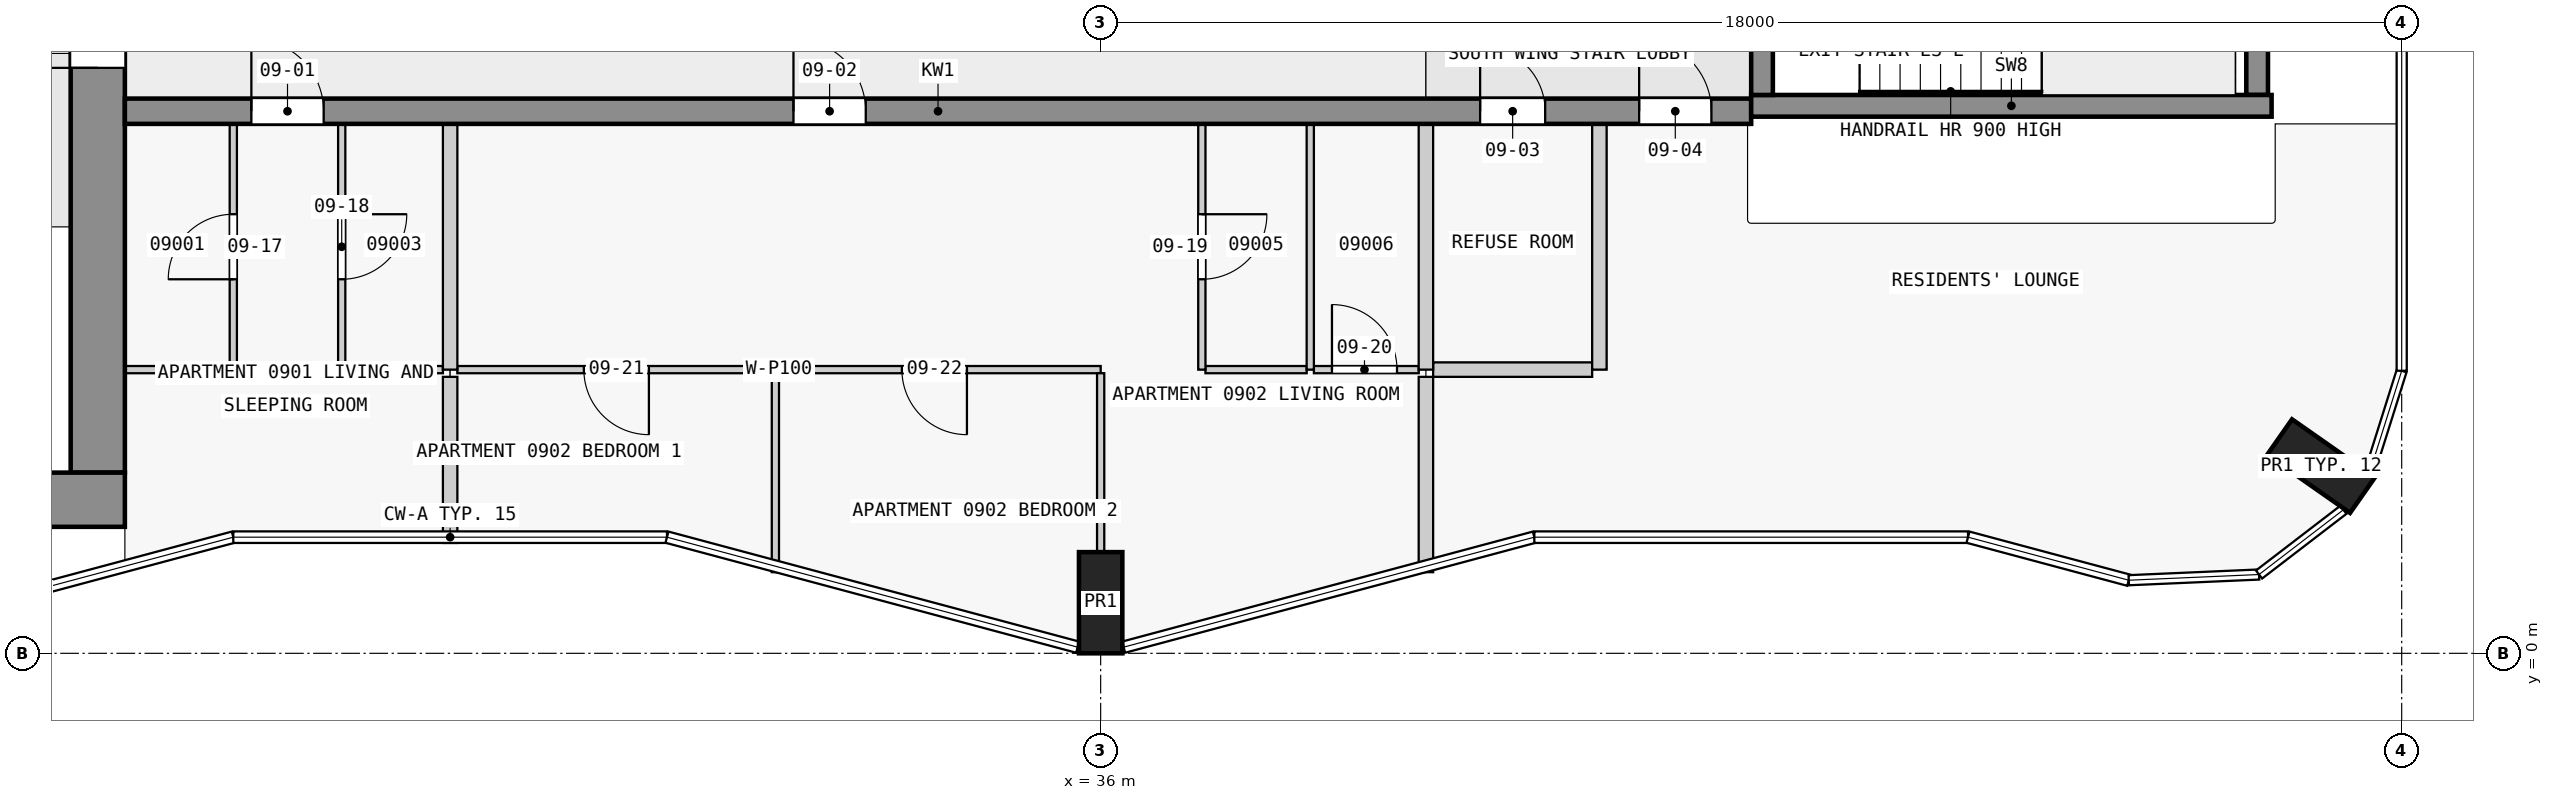
"""IFC4 building model, lengths in metres.
Left out: names, types, materials, properties, quantities, classifications, styles, units other than length and angle.
Written with IfcOpenShell. Run it as: python <this file> out.ifc"""

import sys

from ifc_helpers import new_model, si_unit, direction, frame, frame_2d, origin, origin_2d, place, context, subcontext, project, spatial, rectangle, extrude, element, fill, save


model = new_model("IFC4")
c1 = context("Model", 3, precision=1e-05, world=origin(), true_north=direction((0.0, 1.0)))
c2 = subcontext(c1, "Body", "Model", "MODEL_VIEW")
j1 = project(units=[si_unit("LENGTHUNIT", "METRE"), si_unit("PLANEANGLEUNIT", "RADIAN")], contexts=[c1])
p1 = place(None, origin())
s1 = spatial("IfcSite", under=j1, at=p1, CompositionType="ELEMENT")
p2 = place(p1, origin())
s2 = spatial("IfcBuilding", under=s1, at=p2, CompositionType="ELEMENT")
p3 = place(p2, frame((0.0, 0.0, 40.8)))
s3 = spatial("IfcBuildingStorey", under=s2, at=p3, CompositionType="ELEMENT", Elevation=40.8)
for number, where, z_axis, x_axis in (
    (1, (36.0, 0.7, 0.0), (0.0, 0.0, 1.0), (1.0, 0.0, 0.0)),
    (2, (52.884, 2.59, 0.0), (0.0, 0.0, 1.0), (0.574, 0.819, 0.0)),
):
    element("IfcColumn", number, at=place(p3, frame(where, z_axis=z_axis, x_axis=x_axis)), inside=s3, PredefinedType="COLUMN", context=c2, shape_type="SweptSolid", body=[
        extrude(rectangle(XDim=0.6, YDim=1.4, at=origin_2d()), origin(), (0.0, 0.0, 1.0), 3.5),
    ])
p4 = place(p3, frame((1.55, 2.125, 0.0), z_axis=(0.0, 0.0, 1.0), x_axis=(1.0, 0.0, 0.0)))
e3 = element("IfcWall", 3, at=p4, inside=s3, PredefinedType="SHEAR", context=c2, shape_type="SweptSolid", body=[
    extrude(rectangle(XDim=20.95, YDim=0.75, at=frame_2d((10.475, 0.0))), origin(), (0.0, 0.0, 1.0), 3.25),
])
p5 = place(p3, frame((22.125, 2.5, 0.0), z_axis=(0.0, 0.0, 1.0), x_axis=(0.0, 1.0, 0.0)))
e4 = element("IfcWall", 4, at=p5, inside=s3, PredefinedType="SHEAR", context=c2, shape_type="SweptSolid", body=[
    extrude(rectangle(XDim=14.75, YDim=0.75, at=frame_2d((7.375, 0.0))), origin(), (0.0, 0.0, 1.0), 3.25),
])
p6 = place(p5, frame((5.6, 0.0, 0.0)))
e5 = element("IfcOpeningElement", 5, at=p6, cuts=e4, PredefinedType="OPENING", context=c2, shape_type="SweptSolid", body=[
    extrude(rectangle(XDim=1.8, YDim=2.1, at=frame_2d((0.9, 1.05))), frame((0.0, 0.385, 0.0), z_axis=(0.0, -1.0, 0.0), x_axis=(1.0, 0.0, 0.0)), (0.0, 0.0, 1.0), 0.77),
])
p7 = place(p3, frame((45.15, 7.725, 0.0), z_axis=(0.0, 0.0, 1.0), x_axis=(0.0, 1.0, 0.0)))
e6 = element("IfcWall", 6, at=p7, inside=s3, PredefinedType="SHEAR", context=c2, shape_type="SweptSolid", body=[
    extrude(rectangle(XDim=2.55, YDim=0.3, at=frame_2d((1.275, 0.0))), origin(), (0.0, 0.0, 1.0), 3.5),
])
p8 = place(p7, frame((0.725, 0.0, 0.0)))
e7 = element("IfcOpeningElement", 7, at=p8, cuts=e6, PredefinedType="OPENING", context=c2, shape_type="SweptSolid", body=[
    extrude(rectangle(XDim=1.1, YDim=2.1, at=frame_2d((0.55, 1.05))), frame((0.0, 0.16, 0.0), z_axis=(0.0, -1.0, 0.0), x_axis=(1.0, 0.0, 0.0)), (0.0, 0.0, 1.0), 0.32),
])
p9 = place(p3, frame((52.0, 7.725, 0.0), z_axis=(0.0, 0.0, 1.0), x_axis=(0.0, 1.0, 0.0)))
e8 = element("IfcWall", 8, at=p9, inside=s3, PredefinedType="SHEAR", context=c2, shape_type="SweptSolid", body=[
    extrude(rectangle(XDim=2.55, YDim=0.3, at=frame_2d((1.275, 0.0))), origin(), (0.0, 0.0, 1.0), 3.5),
])
p10 = place(p3, frame((45.0, 7.575, 0.0), z_axis=(0.0, 0.0, 1.0), x_axis=(1.0, 0.0, 0.0)))
e9 = element("IfcWall", 9, at=p10, inside=s3, PredefinedType="SHEAR", context=c2, shape_type="SweptSolid", body=[
    extrude(rectangle(XDim=7.2, YDim=0.3, at=frame_2d((3.6, 0.0))), origin(), (0.0, 0.0, 1.0), 3.5),
])
p11 = place(p3, frame((22.5, 7.5, 0.0), z_axis=(0.0, 0.0, 1.0), x_axis=(1.0, 0.0, 0.0)))
e10 = element("IfcWall", 10, at=p11, inside=s3, PredefinedType="SHEAR", context=c2, shape_type="SweptSolid", body=[
    extrude(rectangle(XDim=22.5, YDim=0.35, at=frame_2d((11.25, 0.0))), origin(), (0.0, 0.0, 1.0), 3.25),
])
p12 = place(p11, frame((1.75, 0.0, 0.0)))
e11 = element("IfcOpeningElement", 11, at=p12, cuts=e10, PredefinedType="OPENING", context=c2, shape_type="SweptSolid", body=[
    extrude(rectangle(XDim=1.0, YDim=2.1, at=frame_2d((0.5, 1.05))), frame((0.0, 0.185, 0.0), z_axis=(0.0, -1.0, 0.0), x_axis=(1.0, 0.0, 0.0)), (0.0, 0.0, 1.0), 0.37),
])
p13 = place(p11, frame((9.25, 0.0, 0.0)))
e12 = element("IfcOpeningElement", 12, at=p13, cuts=e10, PredefinedType="OPENING", context=c2, shape_type="SweptSolid", body=[
    extrude(rectangle(XDim=1.0, YDim=2.1, at=frame_2d((0.5, 1.05))), frame((0.0, 0.185, 0.0), z_axis=(0.0, -1.0, 0.0), x_axis=(1.0, 0.0, 0.0)), (0.0, 0.0, 1.0), 0.37),
])
p14 = place(p11, frame((18.75, 0.0, 0.0)))
e13 = element("IfcOpeningElement", 13, at=p14, cuts=e10, PredefinedType="OPENING", context=c2, shape_type="SweptSolid", body=[
    extrude(rectangle(XDim=0.9, YDim=2.1, at=frame_2d((0.45, 1.05))), frame((0.0, 0.185, 0.0), z_axis=(0.0, -1.0, 0.0), x_axis=(1.0, 0.0, 0.0)), (0.0, 0.0, 1.0), 0.37),
])
p15 = place(p11, frame((20.95, 0.0, 0.0)))
e14 = element("IfcOpeningElement", 14, at=p15, cuts=e10, PredefinedType="OPENING", context=c2, shape_type="SweptSolid", body=[
    extrude(rectangle(XDim=1.0, YDim=2.1, at=frame_2d((0.5, 1.05))), frame((0.0, 0.185, 0.0), z_axis=(0.0, -1.0, 0.0), x_axis=(1.0, 0.0, 0.0)), (0.0, 0.0, 1.0), 0.37),
])
p16 = place(p3, frame((36.0, 3.925, 0.0), z_axis=(0.0, 0.0, 1.0), x_axis=(-1.0, 0.0, 0.0)))
e15 = element("IfcWall", 15, at=p16, inside=s3, PredefinedType="PARTITIONING", context=c2, shape_type="SweptSolid", body=[
    extrude(rectangle(XDim=8.9, YDim=0.1, at=frame_2d((4.45, 0.0))), origin(), (0.0, 0.0, 1.0), 3.25),
])
p17 = place(p16, frame((6.25, 0.0, 0.0)))
e16 = element("IfcOpeningElement", 16, at=p17, cuts=e15, PredefinedType="OPENING", context=c2, shape_type="SweptSolid", body=[
    extrude(rectangle(XDim=0.9, YDim=2.1, at=frame_2d((0.45, 1.05))), frame((0.0, 0.06, 0.0), z_axis=(0.0, -1.0, 0.0), x_axis=(1.0, 0.0, 0.0)), (0.0, 0.0, 1.0), 0.12),
])
p18 = place(p16, frame((1.85, 0.0, 0.0)))
e17 = element("IfcOpeningElement", 17, at=p18, cuts=e15, PredefinedType="OPENING", context=c2, shape_type="SweptSolid", body=[
    extrude(rectangle(XDim=0.9, YDim=2.1, at=frame_2d((0.45, 1.05))), frame((0.0, 0.06, 0.0), z_axis=(0.0, -1.0, 0.0), x_axis=(1.0, 0.0, 0.0)), (0.0, 0.0, 1.0), 0.12),
])
p19 = place(p3, frame((22.5, 3.925, 0.0), z_axis=(0.0, 0.0, 1.0), x_axis=(1.0, 0.0, 0.0)))
e18 = element("IfcWall", 18, at=p19, inside=s3, PredefinedType="PARTITIONING", context=c2, shape_type="SweptSolid", body=[
    extrude(rectangle(XDim=1.45, YDim=0.1, at=frame_2d((0.725, 0.0))), origin(), (0.0, 0.0, 1.0), 3.25),
])
p20 = place(p3, frame((25.55, 3.925, 0.0), z_axis=(0.0, 0.0, 1.0), x_axis=(1.0, 0.0, 0.0)))
e19 = element("IfcWall", 19, at=p20, inside=s3, PredefinedType="PARTITIONING", context=c2, shape_type="SweptSolid", body=[
    extrude(rectangle(XDim=1.35, YDim=0.1, at=frame_2d((0.675, 0.0))), origin(), (0.0, 0.0, 1.0), 3.25),
])
p21 = place(p3, frame((37.45, 3.925, 0.0), z_axis=(0.0, 0.0, 1.0), x_axis=(1.0, 0.0, 0.0)))
e20 = element("IfcWall", 20, at=p21, inside=s3, PredefinedType="PARTITIONING", context=c2, shape_type="SweptSolid", body=[
    extrude(rectangle(XDim=1.4, YDim=0.1, at=frame_2d((0.7, 0.0))), origin(), (0.0, 0.0, 1.0), 3.25),
])
p22 = place(p3, frame((38.95, 3.925, 0.0), z_axis=(0.0, 0.0, 1.0), x_axis=(1.0, 0.0, 0.0)))
e21 = element("IfcWall", 21, at=p22, inside=s3, PredefinedType="PARTITIONING", context=c2, shape_type="SweptSolid", body=[
    extrude(rectangle(XDim=1.45, YDim=0.1, at=frame_2d((0.725, 0.0))), origin(), (0.0, 0.0, 1.0), 3.25),
])
p23 = place(p22, frame((0.25, 0.0, 0.0)))
e22 = element("IfcOpeningElement", 22, at=p23, cuts=e21, PredefinedType="OPENING", context=c2, shape_type="SweptSolid", body=[
    extrude(rectangle(XDim=0.9, YDim=2.1, at=frame_2d((0.45, 1.05))), frame((0.0, 0.06, 0.0), z_axis=(0.0, -1.0, 0.0), x_axis=(1.0, 0.0, 0.0)), (0.0, 0.0, 1.0), 0.12),
])
p24 = place(p3, frame((40.6, 3.925, 0.0), z_axis=(0.0, 0.0, 1.0), x_axis=(1.0, 0.0, 0.0)))
e23 = element("IfcWall", 23, at=p24, inside=s3, PredefinedType="PARTITIONING", context=c2, shape_type="SweptSolid", body=[
    extrude(rectangle(XDim=2.2, YDim=0.2, at=frame_2d((1.1, 0.0))), origin(), (0.0, 0.0, 1.0), 3.25),
])
p25 = place(p3, frame((24.0, 3.925, 0.0), z_axis=(0.0, 0.0, 1.0), x_axis=(0.0, 1.0, 0.0)))
e24 = element("IfcWall", 24, at=p25, inside=s3, PredefinedType="PARTITIONING", context=c2, shape_type="SweptSolid", body=[
    extrude(rectangle(XDim=3.4, YDim=0.1, at=frame_2d((1.7, 0.0))), origin(), (0.0, 0.0, 1.0), 3.25),
])
p26 = place(p25, frame((1.25, 0.0, 0.0)))
e25 = element("IfcOpeningElement", 25, at=p26, cuts=e24, PredefinedType="OPENING", context=c2, shape_type="SweptSolid", body=[
    extrude(rectangle(XDim=0.9, YDim=2.1, at=frame_2d((0.45, 1.05))), frame((0.0, 0.06, 0.0), z_axis=(0.0, -1.0, 0.0), x_axis=(1.0, 0.0, 0.0)), (0.0, 0.0, 1.0), 0.12),
])
p27 = place(p3, frame((25.5, 7.325, 0.0), z_axis=(0.0, 0.0, 1.0), x_axis=(0.0, -1.0, 0.0)))
e26 = element("IfcWall", 26, at=p27, inside=s3, PredefinedType="PARTITIONING", context=c2, shape_type="SweptSolid", body=[
    extrude(rectangle(XDim=3.4, YDim=0.1, at=frame_2d((1.7, 0.0))), origin(), (0.0, 0.0, 1.0), 3.25),
])
p28 = place(p27, frame((1.25, 0.0, 0.0)))
e27 = element("IfcOpeningElement", 27, at=p28, cuts=e26, PredefinedType="OPENING", context=c2, shape_type="SweptSolid", body=[
    extrude(rectangle(XDim=0.9, YDim=2.1, at=frame_2d((0.45, 1.05))), frame((0.0, 0.06, 0.0), z_axis=(0.0, -1.0, 0.0), x_axis=(1.0, 0.0, 0.0)), (0.0, 0.0, 1.0), 0.12),
])
p29 = place(p3, frame((27.0, 3.825, 0.0), z_axis=(0.0, 0.0, 1.0), x_axis=(0.0, -1.0, 0.0)))
e28 = element("IfcWall", 28, at=p29, inside=s3, PredefinedType="PARTITIONING", context=c2, shape_type="SweptSolid", body=[
    extrude(rectangle(XDim=2.298, YDim=0.2, at=frame_2d((1.149, 0.0))), origin(), (0.0, 0.0, 1.0), 3.25),
])
p30 = place(p3, frame((27.0, 3.925, 0.0), z_axis=(0.0, 0.0, 1.0), x_axis=(0.0, 1.0, 0.0)))
e29 = element("IfcWall", 29, at=p30, inside=s3, PredefinedType="PARTITIONING", context=c2, shape_type="SweptSolid", body=[
    extrude(rectangle(XDim=3.4, YDim=0.2, at=frame_2d((1.7, 0.0))), origin(), (0.0, 0.0, 1.0), 3.25),
])
p31 = place(p3, frame((31.5, 1.122, 0.0), z_axis=(0.0, 0.0, 1.0), x_axis=(0.0, 1.0, 0.0)))
e30 = element("IfcWall", 30, at=p31, inside=s3, PredefinedType="PARTITIONING", context=c2, shape_type="SweptSolid", body=[
    extrude(rectangle(XDim=2.753, YDim=0.1, at=frame_2d((1.376, 0.0))), origin(), (0.0, 0.0, 1.0), 3.25),
])
p32 = place(p3, frame((36.0, 1.4, 0.0), z_axis=(0.0, 0.0, 1.0), x_axis=(0.0, 1.0, 0.0)))
e31 = element("IfcWall", 31, at=p32, inside=s3, PredefinedType="PARTITIONING", context=c2, shape_type="SweptSolid", body=[
    extrude(rectangle(XDim=2.475, YDim=0.1, at=frame_2d((1.238, 0.0))), origin(), (0.0, 0.0, 1.0), 3.25),
])
p33 = place(p3, frame((37.4, 7.325, 0.0), z_axis=(0.0, 0.0, 1.0), x_axis=(0.0, -1.0, 0.0)))
e32 = element("IfcWall", 32, at=p33, inside=s3, PredefinedType="PARTITIONING", context=c2, shape_type="SweptSolid", body=[
    extrude(rectangle(XDim=3.4, YDim=0.1, at=frame_2d((1.7, 0.0))), origin(), (0.0, 0.0, 1.0), 3.25),
])
p34 = place(p33, frame((1.25, 0.0, 0.0)))
e33 = element("IfcOpeningElement", 33, at=p34, cuts=e32, PredefinedType="OPENING", context=c2, shape_type="SweptSolid", body=[
    extrude(rectangle(XDim=0.9, YDim=2.1, at=frame_2d((0.45, 1.05))), frame((0.0, 0.06, 0.0), z_axis=(0.0, -1.0, 0.0), x_axis=(1.0, 0.0, 0.0)), (0.0, 0.0, 1.0), 0.12),
])
p35 = place(p3, frame((38.9, 3.925, 0.0), z_axis=(0.0, 0.0, 1.0), x_axis=(0.0, 1.0, 0.0)))
e34 = element("IfcWall", 34, at=p35, inside=s3, PredefinedType="PARTITIONING", context=c2, shape_type="SweptSolid", body=[
    extrude(rectangle(XDim=3.4, YDim=0.1, at=frame_2d((1.7, 0.0))), origin(), (0.0, 0.0, 1.0), 3.25),
])
p36 = place(p3, frame((40.5, 3.825, 0.0), z_axis=(0.0, 0.0, 1.0), x_axis=(0.0, -1.0, 0.0)))
e35 = element("IfcWall", 35, at=p36, inside=s3, PredefinedType="PARTITIONING", context=c2, shape_type="SweptSolid", body=[
    extrude(rectangle(XDim=2.703, YDim=0.2, at=frame_2d((1.351, 0.0))), origin(), (0.0, 0.0, 1.0), 3.25),
])
for number, where, z_axis, x_axis in (
    (36, (40.5, 3.925, 0.0), (0.0, 0.0, 1.0), (0.0, 1.0, 0.0)),
    (37, (42.9, 3.925, 0.0), (0.0, 0.0, 1.0), (0.0, 1.0, 0.0)),
):
    element("IfcWall", number, at=place(p3, frame(where, z_axis=z_axis, x_axis=x_axis)), inside=s3, PredefinedType="PARTITIONING", context=c2, shape_type="SweptSolid", body=[
        extrude(rectangle(XDim=3.4, YDim=0.2, at=frame_2d((1.7, 0.0))), origin(), (0.0, 0.0, 1.0), 3.25),
    ])
p37 = place(p6, origin())
e38 = element("IfcDoor", 38, at=p37, inside=s3, OperationType="DOUBLE_DOOR_SINGLE_SWING", PredefinedType="DOOR", context=c2, shape_type="SweptSolid", body=[
    extrude(rectangle(XDim=1.8, YDim=2.1, at=frame_2d((0.9, 1.05))), frame((0.0, 0.025, 0.0), z_axis=(0.0, -1.0, 0.0), x_axis=(1.0, 0.0, 0.0)), (0.0, 0.0, 1.0), 0.05),
])
fill(e5, e38)
p38 = place(p12, origin())
e39 = element("IfcDoor", 39, at=p38, inside=s3, OperationType="SINGLE_SWING_LEFT", PredefinedType="DOOR", context=c2, shape_type="SweptSolid", body=[
    extrude(rectangle(XDim=1.0, YDim=2.1, at=frame_2d((0.5, 1.05))), frame((0.0, 0.025, 0.0), z_axis=(0.0, -1.0, 0.0), x_axis=(1.0, 0.0, 0.0)), (0.0, 0.0, 1.0), 0.05),
])
fill(e11, e39)
p39 = place(p13, origin())
e40 = element("IfcDoor", 40, at=p39, inside=s3, OperationType="SINGLE_SWING_LEFT", PredefinedType="DOOR", context=c2, shape_type="SweptSolid", body=[
    extrude(rectangle(XDim=1.0, YDim=2.1, at=frame_2d((0.5, 1.05))), frame((0.0, 0.025, 0.0), z_axis=(0.0, -1.0, 0.0), x_axis=(1.0, 0.0, 0.0)), (0.0, 0.0, 1.0), 0.05),
])
fill(e12, e40)
p40 = place(p14, origin())
e41 = element("IfcDoor", 41, at=p40, inside=s3, OperationType="SINGLE_SWING_RIGHT", PredefinedType="DOOR", context=c2, shape_type="SweptSolid", body=[
    extrude(rectangle(XDim=0.9, YDim=2.1, at=frame_2d((0.45, 1.05))), frame((0.0, 0.025, 0.0), z_axis=(0.0, -1.0, 0.0), x_axis=(1.0, 0.0, 0.0)), (0.0, 0.0, 1.0), 0.05),
])
fill(e13, e41)
p41 = place(p15, origin())
e42 = element("IfcDoor", 42, at=p41, inside=s3, OperationType="SINGLE_SWING_RIGHT", PredefinedType="DOOR", context=c2, shape_type="SweptSolid", body=[
    extrude(rectangle(XDim=1.0, YDim=2.1, at=frame_2d((0.5, 1.05))), frame((0.0, 0.025, 0.0), z_axis=(0.0, -1.0, 0.0), x_axis=(1.0, 0.0, 0.0)), (0.0, 0.0, 1.0), 0.05),
])
fill(e14, e42)
p42 = place(p26, origin())
e43 = element("IfcDoor", 43, at=p42, inside=s3, OperationType="SINGLE_SWING_LEFT", PredefinedType="DOOR", context=c2, shape_type="SweptSolid", body=[
    extrude(rectangle(XDim=0.9, YDim=2.1, at=frame_2d((0.45, 1.05))), frame((0.0, 0.025, 0.0), z_axis=(0.0, -1.0, 0.0), x_axis=(1.0, 0.0, 0.0)), (0.0, 0.0, 1.0), 0.05),
])
fill(e25, e43)
p43 = place(p28, origin())
e44 = element("IfcDoor", 44, at=p43, inside=s3, OperationType="SINGLE_SWING_LEFT", PredefinedType="DOOR", context=c2, shape_type="SweptSolid", body=[
    extrude(rectangle(XDim=0.9, YDim=2.1, at=frame_2d((0.45, 1.05))), frame((0.0, 0.025, 0.0), z_axis=(0.0, -1.0, 0.0), x_axis=(1.0, 0.0, 0.0)), (0.0, 0.0, 1.0), 0.05),
])
fill(e27, e44)
p44 = place(p34, origin())
e45 = element("IfcDoor", 45, at=p44, inside=s3, OperationType="SINGLE_SWING_LEFT", PredefinedType="DOOR", context=c2, shape_type="SweptSolid", body=[
    extrude(rectangle(XDim=0.9, YDim=2.1, at=frame_2d((0.45, 1.05))), frame((0.0, 0.025, 0.0), z_axis=(0.0, -1.0, 0.0), x_axis=(1.0, 0.0, 0.0)), (0.0, 0.0, 1.0), 0.05),
])
fill(e33, e45)
p45 = place(p23, origin())
e46 = element("IfcDoor", 46, at=p45, inside=s3, OperationType="SINGLE_SWING_LEFT", PredefinedType="DOOR", context=c2, shape_type="SweptSolid", body=[
    extrude(rectangle(XDim=0.9, YDim=2.1, at=frame_2d((0.45, 1.05))), frame((0.0, 0.025, 0.0), z_axis=(0.0, -1.0, 0.0), x_axis=(1.0, 0.0, 0.0)), (0.0, 0.0, 1.0), 0.05),
])
fill(e22, e46)
p46 = place(p17, origin())
e47 = element("IfcDoor", 47, at=p46, inside=s3, OperationType="SINGLE_SWING_RIGHT", PredefinedType="DOOR", context=c2, shape_type="SweptSolid", body=[
    extrude(rectangle(XDim=0.9, YDim=2.1, at=frame_2d((0.45, 1.05))), frame((0.0, 0.025, 0.0), z_axis=(0.0, -1.0, 0.0), x_axis=(1.0, 0.0, 0.0)), (0.0, 0.0, 1.0), 0.05),
])
fill(e16, e47)
p47 = place(p18, origin())
e48 = element("IfcDoor", 48, at=p47, inside=s3, OperationType="SINGLE_SWING_LEFT", PredefinedType="DOOR", context=c2, shape_type="SweptSolid", body=[
    extrude(rectangle(XDim=0.9, YDim=2.1, at=frame_2d((0.45, 1.05))), frame((0.0, 0.025, 0.0), z_axis=(0.0, -1.0, 0.0), x_axis=(1.0, 0.0, 0.0)), (0.0, 0.0, 1.0), 0.05),
])
fill(e17, e48)
save(model, sys.argv[1])
